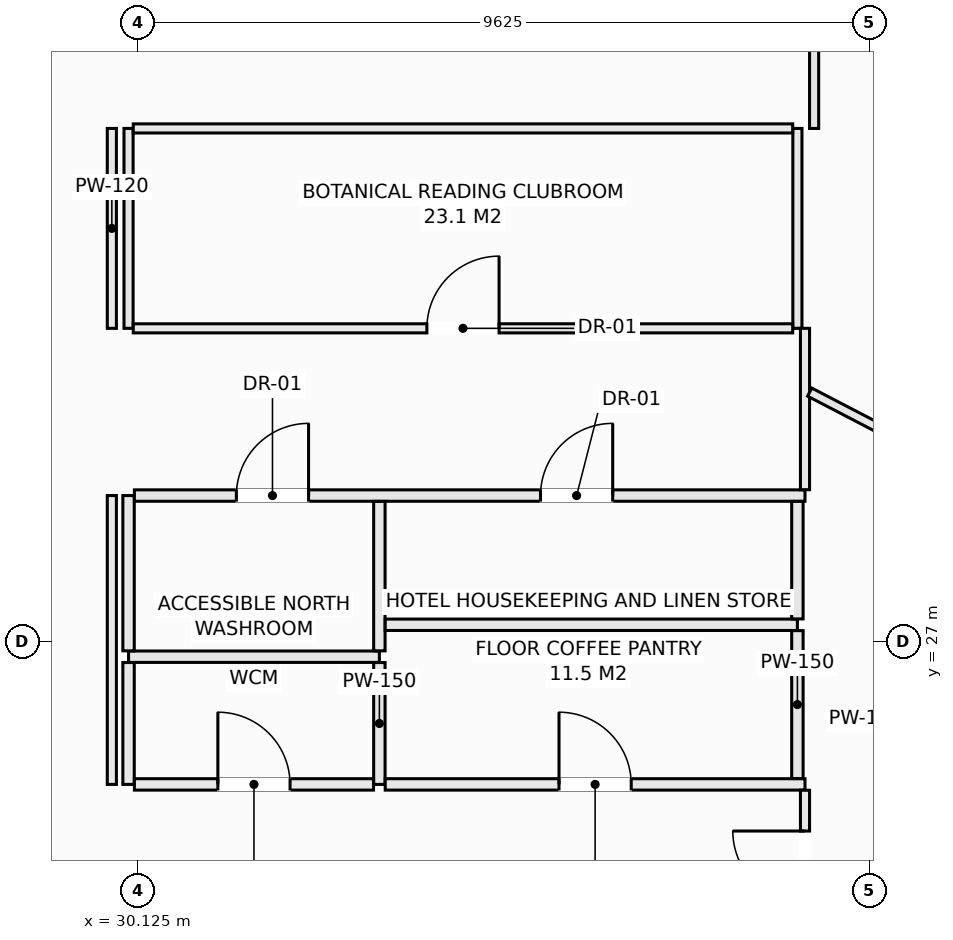
"""IFC4 building model, lengths in metres.
Left out: names, types, materials, properties, quantities, classifications, styles, units other than length and angle.
Written with IfcOpenShell. Run it as: python <this file> out.ifc"""

import sys

from ifc_helpers import new_model, si_unit, direction, frame, frame_2d, origin, place, context, subcontext, project, spatial, rectangle, extrude, element, fill, save


model = new_model("IFC4")
c1 = context("Model", 3, precision=1e-05, world=origin(), true_north=direction((0.0, 1.0)))
c2 = subcontext(c1, "Body", "Model", "MODEL_VIEW")
j1 = project(units=[si_unit("LENGTHUNIT", "METRE"), si_unit("PLANEANGLEUNIT", "RADIAN")], contexts=[c1])
p1 = place(None, origin())
s1 = spatial("IfcSite", under=j1, at=p1, CompositionType="ELEMENT")
p2 = place(p1, origin())
s2 = spatial("IfcBuilding", under=s1, at=p2, CompositionType="ELEMENT")
p3 = place(p2, frame((0.0, 0.0, 169.9)))
s3 = spatial("IfcBuildingStorey", under=s2, at=p3, CompositionType="ELEMENT", Elevation=169.9)
p4 = place(p3, frame((30.0, 26.8, 0.0), z_axis=(0.0, 0.0, 1.0), x_axis=(1.0, 0.0, 0.0)))
e1 = element("IfcWall", 1, at=p4, inside=s3, PredefinedType="PARTITIONING", context=c2, shape_type="SweptSolid", body=[
    extrude(rectangle(XDim=3.3, YDim=0.15, at=frame_2d((1.65, 0.0))), origin(), (0.0, 0.0, 1.0), 3.13),
])
p5 = place(p3, frame((30.0, 25.12, 0.0), z_axis=(0.0, 0.0, 1.0), x_axis=(0.0, 1.0, 0.0)))
e2 = element("IfcWall", 2, at=p5, inside=s3, PredefinedType="PARTITIONING", context=c2, shape_type="SweptSolid", body=[
    extrude(rectangle(XDim=1.603, YDim=0.15, at=frame_2d((0.801, 0.0))), origin(), (0.0, 0.0, 1.0), 3.13),
])
p6 = place(p3, frame((30.0, 26.877, 0.0), z_axis=(0.0, 0.0, 1.0), x_axis=(0.0, 1.0, 0.0)))
e3 = element("IfcWall", 3, at=p6, inside=s3, PredefinedType="PARTITIONING", context=c2, shape_type="SweptSolid", body=[
    extrude(rectangle(XDim=2.043, YDim=0.15, at=frame_2d((1.021, 0.0))), origin(), (0.0, 0.0, 1.0), 3.13),
])
p7 = place(p3, frame((30.0, 31.12, 0.0), z_axis=(0.0, 0.0, 1.0), x_axis=(0.0, 1.0, 0.0)))
e4 = element("IfcWall", 4, at=p7, inside=s3, PredefinedType="PARTITIONING", context=c2, shape_type="SweptSolid", body=[
    extrude(rectangle(XDim=2.63, YDim=0.12, at=frame_2d((1.315, 0.0))), origin(), (0.0, 0.0, 1.0), 3.13),
])
p8 = place(p3, frame((30.077, 28.92, 0.0), z_axis=(0.0, 0.0, 1.0), x_axis=(1.0, 0.0, 0.0)))
e5 = element("IfcWall", 5, at=p8, inside=s3, PredefinedType="PARTITIONING", context=c2, shape_type="SweptSolid", body=[
    extrude(rectangle(XDim=8.823, YDim=0.15, at=frame_2d((4.412, 0.0))), origin(), (0.0, 0.0, 1.0), 3.13),
])
p9 = place(p8, frame((1.342, 0.0, 0.0)))
e6 = element("IfcOpeningElement", 6, at=p9, cuts=e5, PredefinedType="OPENING", context=c2, shape_type="SweptSolid", body=[
    extrude(rectangle(XDim=0.95, YDim=2.1, at=frame_2d((0.475, 1.05))), frame((0.0, 0.085, 0.0), z_axis=(0.0, -1.0, 0.0), x_axis=(1.0, 0.0, 0.0)), (0.0, 0.0, 1.0), 0.17),
])
p10 = place(p8, frame((5.343, 0.0, 0.0)))
e7 = element("IfcOpeningElement", 7, at=p10, cuts=e5, PredefinedType="OPENING", context=c2, shape_type="SweptSolid", body=[
    extrude(rectangle(XDim=0.95, YDim=2.1, at=frame_2d((0.475, 1.05))), frame((0.0, 0.085, 0.0), z_axis=(0.0, -1.0, 0.0), x_axis=(1.0, 0.0, 0.0)), (0.0, 0.0, 1.0), 0.17),
])
p11 = place(p3, frame((33.3, 25.12, 0.0), z_axis=(0.0, 0.0, 1.0), x_axis=(0.0, 1.0, 0.0)))
e8 = element("IfcWall", 8, at=p11, inside=s3, PredefinedType="PARTITIONING", context=c2, shape_type="SweptSolid", body=[
    extrude(rectangle(XDim=1.603, YDim=0.15, at=frame_2d((0.801, 0.0))), origin(), (0.0, 0.0, 1.0), 3.13),
])
p12 = place(p3, frame((33.3, 26.877, 0.0), z_axis=(0.0, 0.0, 1.0), x_axis=(0.0, 1.0, 0.0)))
e9 = element("IfcWall", 9, at=p12, inside=s3, PredefinedType="PARTITIONING", context=c2, shape_type="SweptSolid", body=[
    extrude(rectangle(XDim=1.966, YDim=0.15, at=frame_2d((0.983, 0.0))), origin(), (0.0, 0.0, 1.0), 3.13),
])
p13 = place(p3, frame((30.077, 25.12, 0.0), z_axis=(0.0, 0.0, 1.0), x_axis=(1.0, 0.0, 0.0)))
e10 = element("IfcWall", 10, at=p13, inside=s3, PredefinedType="PARTITIONING", context=c2, shape_type="SweptSolid", body=[
    extrude(rectangle(XDim=3.146, YDim=0.15, at=frame_2d((1.573, 0.0))), origin(), (0.0, 0.0, 1.0), 3.13),
])
p14 = place(p13, frame((1.098, 0.0, 0.0)))
e11 = element("IfcOpeningElement", 11, at=p14, cuts=e10, PredefinedType="OPENING", context=c2, shape_type="SweptSolid", body=[
    extrude(rectangle(XDim=0.95, YDim=2.1, at=frame_2d((0.475, 1.05))), frame((0.0, 0.085, 0.0), z_axis=(0.0, -1.0, 0.0), x_axis=(1.0, 0.0, 0.0)), (0.0, 0.0, 1.0), 0.17),
])
p15 = place(p3, frame((33.377, 25.12, 0.0), z_axis=(0.0, 0.0, 1.0), x_axis=(1.0, 0.0, 0.0)))
e12 = element("IfcWall", 12, at=p15, inside=s3, PredefinedType="PARTITIONING", context=c2, shape_type="SweptSolid", body=[
    extrude(rectangle(XDim=5.523, YDim=0.15, at=frame_2d((2.761, 0.0))), origin(), (0.0, 0.0, 1.0), 3.13),
])
p16 = place(p15, frame((2.287, 0.0, 0.0)))
e13 = element("IfcOpeningElement", 13, at=p16, cuts=e12, PredefinedType="OPENING", context=c2, shape_type="SweptSolid", body=[
    extrude(rectangle(XDim=0.95, YDim=2.1, at=frame_2d((0.475, 1.05))), frame((0.0, 0.085, 0.0), z_axis=(0.0, -1.0, 0.0), x_axis=(1.0, 0.0, 0.0)), (0.0, 0.0, 1.0), 0.17),
])
p17 = place(p3, frame((33.377, 27.22, 0.0), z_axis=(0.0, 0.0, 1.0), x_axis=(1.0, 0.0, 0.0)))
e14 = element("IfcWall", 14, at=p17, inside=s3, PredefinedType="PARTITIONING", context=c2, shape_type="SweptSolid", body=[
    extrude(rectangle(XDim=5.423, YDim=0.15, at=frame_2d((2.711, 0.0))), origin(), (0.0, 0.0, 1.0), 3.13),
])
p18 = place(p3, frame((38.8, 25.197, 0.0), z_axis=(0.0, 0.0, 1.0), x_axis=(0.0, 1.0, 0.0)))
e15 = element("IfcWall", 15, at=p18, inside=s3, PredefinedType="PARTITIONING", context=c2, shape_type="SweptSolid", body=[
    extrude(rectangle(XDim=1.946, YDim=0.15, at=frame_2d((0.973, 0.0))), origin(), (0.0, 0.0, 1.0), 3.13),
])
p19 = place(p3, frame((38.8, 27.297, 0.0), z_axis=(0.0, 0.0, 1.0), x_axis=(0.0, 1.0, 0.0)))
e16 = element("IfcWall", 16, at=p19, inside=s3, PredefinedType="PARTITIONING", context=c2, shape_type="SweptSolid", body=[
    extrude(rectangle(XDim=1.546, YDim=0.15, at=frame_2d((0.773, 0.0))), origin(), (0.0, 0.0, 1.0), 3.13),
])
p20 = place(p3, frame((38.8, 31.12, 0.0), z_axis=(0.0, 0.0, 1.0), x_axis=(0.0, 1.0, 0.0)))
e17 = element("IfcWall", 17, at=p20, inside=s3, PredefinedType="PARTITIONING", context=c2, shape_type="SweptSolid", body=[
    extrude(rectangle(XDim=2.63, YDim=0.12, at=frame_2d((1.315, 0.0))), origin(), (0.0, 0.0, 1.0), 3.13),
])
p21 = place(p3, frame((30.062, 31.12, 0.0), z_axis=(0.0, 0.0, 1.0), x_axis=(1.0, 0.0, 0.0)))
e18 = element("IfcWall", 18, at=p21, inside=s3, PredefinedType="PARTITIONING", context=c2, shape_type="SweptSolid", body=[
    extrude(rectangle(XDim=8.676, YDim=0.12, at=frame_2d((4.338, 0.0))), origin(), (0.0, 0.0, 1.0), 3.13),
])
p22 = place(p21, frame((3.863, 0.0, 0.0)))
e19 = element("IfcOpeningElement", 19, at=p22, cuts=e18, PredefinedType="OPENING", context=c2, shape_type="SweptSolid", body=[
    extrude(rectangle(XDim=0.95, YDim=2.1, at=frame_2d((0.475, 1.05))), frame((0.0, 0.07, 0.0), z_axis=(0.0, -1.0, 0.0), x_axis=(1.0, 0.0, 0.0)), (0.0, 0.0, 1.0), 0.14),
])
p23 = place(p3, frame((30.062, 33.75, 0.0), z_axis=(0.0, 0.0, 1.0), x_axis=(1.0, 0.0, 0.0)))
e20 = element("IfcWall", 20, at=p23, inside=s3, PredefinedType="PARTITIONING", context=c2, shape_type="SweptSolid", body=[
    extrude(rectangle(XDim=8.676, YDim=0.12, at=frame_2d((4.338, 0.0))), origin(), (0.0, 0.0, 1.0), 3.13),
])
p24 = place(p3, frame((39.02, 33.75, 0.0), z_axis=(0.0, 0.0, 1.0), x_axis=(0.0, 1.0, 0.0)))
e21 = element("IfcWall", 21, at=p24, inside=s3, PredefinedType="PARTITIONING", context=c2, shape_type="SweptSolid", body=[
    extrude(rectangle(XDim=2.0, YDim=0.12, at=frame_2d((1.0, 0.0))), origin(), (0.0, 0.0, 1.0), 3.13),
])
p25 = place(p3, frame((29.78, 25.12, 0.0), z_axis=(0.0, 0.0, 1.0), x_axis=(0.0, 1.0, 0.0)))
e22 = element("IfcWall", 22, at=p25, inside=s3, PredefinedType="PARTITIONING", context=c2, shape_type="SweptSolid", body=[
    extrude(rectangle(XDim=3.8, YDim=0.12, at=frame_2d((1.9, 0.0))), origin(), (0.0, 0.0, 1.0), 3.13),
])
p26 = place(p3, frame((29.78, 31.12, 0.0), z_axis=(0.0, 0.0, 1.0), x_axis=(0.0, 1.0, 0.0)))
e23 = element("IfcWall", 23, at=p26, inside=s3, PredefinedType="PARTITIONING", context=c2, shape_type="SweptSolid", body=[
    extrude(rectangle(XDim=2.63, YDim=0.12, at=frame_2d((1.315, 0.0))), origin(), (0.0, 0.0, 1.0), 3.13),
])
p27 = place(p3, frame((38.9, 23.02, 0.0), z_axis=(0.0, 0.0, 1.0), x_axis=(0.0, 1.0, 0.0)))
e24 = element("IfcWall", 24, at=p27, inside=s3, PredefinedType="PARTITIONING", context=c2, shape_type="SweptSolid", body=[
    extrude(rectangle(XDim=2.023, YDim=0.12, at=frame_2d((1.011, 0.0))), origin(), (0.0, 0.0, 1.0), 3.13),
])
p28 = place(p27, frame((0.537, 0.0, 0.0)))
e25 = element("IfcOpeningElement", 25, at=p28, cuts=e24, PredefinedType="OPENING", context=c2, shape_type="SweptSolid", body=[
    extrude(rectangle(XDim=0.95, YDim=2.1, at=frame_2d((0.475, 1.05))), frame((0.0, 0.07, 0.0), z_axis=(0.0, -1.0, 0.0), x_axis=(1.0, 0.0, 0.0)), (0.0, 0.0, 1.0), 0.14),
])
p29 = place(p3, frame((38.9, 28.997, 0.0), z_axis=(0.0, 0.0, 1.0), x_axis=(0.0, 1.0, 0.0)))
e26 = element("IfcWall", 26, at=p29, inside=s3, PredefinedType="PARTITIONING", context=c2, shape_type="SweptSolid", body=[
    extrude(rectangle(XDim=2.123, YDim=0.12, at=frame_2d((1.062, 0.0))), origin(), (0.0, 0.0, 1.0), 3.13),
])
p30 = place(p3, frame((38.962, 30.281, 0.0), z_axis=(0.0, 0.0, 1.0), x_axis=(0.887114590422, -0.461549242725, 0.0)))
e27 = element("IfcWall", 27, at=p30, inside=s3, PredefinedType="PARTITIONING", context=c2, shape_type="SweptSolid", body=[
    extrude(rectangle(XDim=14.004, YDim=0.12, at=frame_2d((7.002, 0.0))), origin(), (0.0, 0.0, 1.0), 2.505),
])
p31 = place(p3, frame((39.023, 20.874, 0.0), z_axis=(0.0, 0.0, 1.0), x_axis=(0.636698291185, 0.771113017658, 0.0)))
e28 = element("IfcWall", 28, at=p31, inside=s3, PredefinedType="PARTITIONING", context=c2, shape_type="SweptSolid", body=[
    extrude(rectangle(XDim=8.44, YDim=0.15, at=frame_2d((4.22, 0.0))), origin(), (0.0, 0.0, 1.0), 2.505),
])
p32 = place(p9, origin())
e29 = element("IfcDoor", 29, at=p32, inside=s3, OperationType="SINGLE_SWING_RIGHT", PredefinedType="DOOR", context=c2, shape_type="SweptSolid", body=[
    extrude(rectangle(XDim=0.95, YDim=2.1, at=frame_2d((0.475, 1.05))), frame((0.0, 0.025, 0.0), z_axis=(0.0, -1.0, 0.0), x_axis=(1.0, 0.0, 0.0)), (0.0, 0.0, 1.0), 0.05),
])
fill(e6, e29)
p33 = place(p14, origin())
e30 = element("IfcDoor", 30, at=p33, inside=s3, OperationType="SINGLE_SWING_LEFT", PredefinedType="DOOR", context=c2, shape_type="SweptSolid", body=[
    extrude(rectangle(XDim=0.95, YDim=2.1, at=frame_2d((0.475, 1.05))), frame((0.0, 0.025, 0.0), z_axis=(0.0, -1.0, 0.0), x_axis=(1.0, 0.0, 0.0)), (0.0, 0.0, 1.0), 0.05),
])
fill(e11, e30)
p34 = place(p10, origin())
e31 = element("IfcDoor", 31, at=p34, inside=s3, OperationType="SINGLE_SWING_RIGHT", PredefinedType="DOOR", context=c2, shape_type="SweptSolid", body=[
    extrude(rectangle(XDim=0.95, YDim=2.1, at=frame_2d((0.475, 1.05))), frame((0.0, 0.025, 0.0), z_axis=(0.0, -1.0, 0.0), x_axis=(1.0, 0.0, 0.0)), (0.0, 0.0, 1.0), 0.05),
])
fill(e7, e31)
p35 = place(p16, origin())
e32 = element("IfcDoor", 32, at=p35, inside=s3, OperationType="SINGLE_SWING_LEFT", PredefinedType="DOOR", context=c2, shape_type="SweptSolid", body=[
    extrude(rectangle(XDim=0.95, YDim=2.1, at=frame_2d((0.475, 1.05))), frame((0.0, 0.025, 0.0), z_axis=(0.0, -1.0, 0.0), x_axis=(1.0, 0.0, 0.0)), (0.0, 0.0, 1.0), 0.05),
])
fill(e13, e32)
p36 = place(p22, origin())
e33 = element("IfcDoor", 33, at=p36, inside=s3, OperationType="SINGLE_SWING_RIGHT", PredefinedType="DOOR", context=c2, shape_type="SweptSolid", body=[
    extrude(rectangle(XDim=0.95, YDim=2.1, at=frame_2d((0.475, 1.05))), frame((0.0, 0.025, 0.0), z_axis=(0.0, -1.0, 0.0), x_axis=(1.0, 0.0, 0.0)), (0.0, 0.0, 1.0), 0.05),
])
fill(e19, e33)
p37 = place(p28, origin())
e34 = element("IfcDoor", 34, at=p37, inside=s3, OperationType="SINGLE_SWING_RIGHT", PredefinedType="DOOR", context=c2, shape_type="SweptSolid", body=[
    extrude(rectangle(XDim=0.95, YDim=2.1, at=frame_2d((0.475, 1.05))), frame((0.0, 0.025, 0.0), z_axis=(0.0, -1.0, 0.0), x_axis=(1.0, 0.0, 0.0)), (0.0, 0.0, 1.0), 0.05),
])
fill(e25, e34)
save(model, sys.argv[1])
